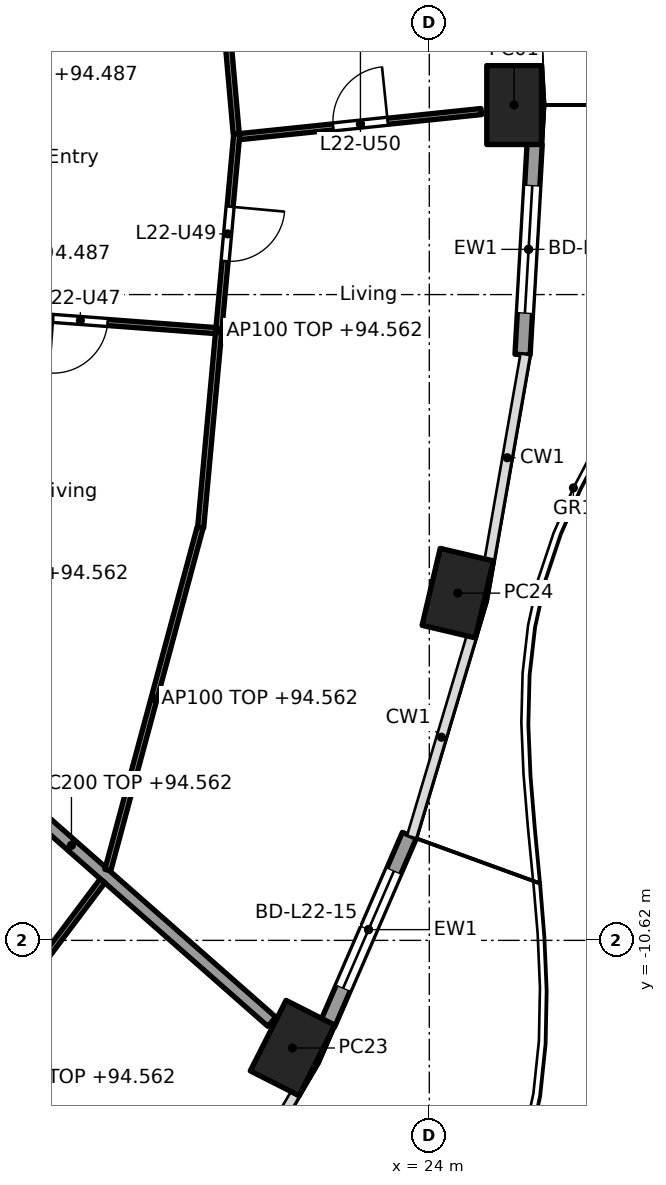
"""IFC4 building model, lengths in metres.
Left out: names, types, materials, properties, quantities, classifications, styles, units other than length and angle.
Written with IfcOpenShell. Run it as: python <this file> out.ifc"""

import sys

from ifc_helpers import new_model, si_unit, direction, frame, frame_2d, origin, origin_2d, place, context, subcontext, project, spatial, rectangle, hollow_rectangle, extrude, element, fill, save


model = new_model("IFC4")
c1 = context("Model", 3, precision=1e-05, world=origin(), true_north=direction((0.0, 1.0)))
c2 = subcontext(c1, "Body", "Model", "MODEL_VIEW")
j1 = project(units=[si_unit("LENGTHUNIT", "METRE"), si_unit("PLANEANGLEUNIT", "RADIAN")], contexts=[c1])
p1 = place(None, origin())
s1 = spatial("IfcSite", under=j1, at=p1, CompositionType="ELEMENT")
p2 = place(p1, origin())
s2 = spatial("IfcBuilding", under=s1, at=p2, CompositionType="ELEMENT")
p3 = place(p2, frame((0.0, 0.0, 91.8)))
s3 = spatial("IfcBuildingStorey", under=s2, at=p3, CompositionType="ELEMENT", Elevation=91.8)
for number, where, z_axis, x_axis in (
    (1, (25.395, 3.118, 0.0), (0.0, 0.0, 1.0), (0.0, 1.0, 0.0)),
    (2, (21.751, -12.39, 0.0), (0.0, 0.0, 1.0), (0.452, 0.892, 0.0)),
    (3, (24.468, -4.91, 0.0), (0.0, 0.0, 1.0), (0.229, 0.973, 0.0)),
):
    element("IfcColumn", number, at=place(p3, frame(where, z_axis=z_axis, x_axis=x_axis)), inside=s3, PredefinedType="COLUMN", context=c2, shape_type="SweptSolid", body=[
        extrude(hollow_rectangle(XDim=1.3, YDim=0.9, WallThickness=0.045, at=origin_2d()), origin(), (0.0, 0.0, 1.0), 3.7),
    ])
p4 = place(p3, frame((23.672, -8.893, 0.0), z_axis=(0.0, 0.0, 1.0), x_axis=(-0.397621629246, -0.917549475481, 0.0)))
e4 = element("IfcWall", 4, at=p4, inside=s3, PredefinedType="SOLIDWALL", context=c2, shape_type="SweptSolid", body=[
    extrude(rectangle(XDim=3.379, YDim=0.25, at=frame_2d((1.69, 0.0))), origin(), (0.0, 0.0, 1.0), 3.44),
])
p5 = place(p4, frame((0.64, 0.0, 0.0)))
e5 = element("IfcOpeningElement", 5, at=p5, cuts=e4, PredefinedType="OPENING", context=c2, shape_type="SweptSolid", body=[
    extrude(rectangle(XDim=2.1, YDim=2.4, at=frame_2d((1.05, 1.2))), frame((0.0, 0.135, 0.0), z_axis=(0.0, -1.0, 0.0), x_axis=(1.0, 0.0, 0.0)), (0.0, 0.0, 1.0), 0.27),
])
p6 = place(p3, frame((25.733, 2.476, 0.0), z_axis=(0.0, 0.0, 1.0), x_axis=(-0.057542602614, -0.998343051703, 0.0)))
e6 = element("IfcWall", 6, at=p6, inside=s3, PredefinedType="SOLIDWALL", context=c2, shape_type="SweptSolid", body=[
    extrude(rectangle(XDim=3.471, YDim=0.25, at=frame_2d((1.735, 0.0))), origin(), (0.0, 0.0, 1.0), 3.44),
])
p7 = place(p6, frame((0.685, 0.0, 0.0)))
e7 = element("IfcOpeningElement", 7, at=p7, cuts=e6, PredefinedType="OPENING", context=c2, shape_type="SweptSolid", body=[
    extrude(rectangle(XDim=2.1, YDim=2.4, at=frame_2d((1.05, 1.2))), frame((0.0, 0.135, 0.0), z_axis=(0.0, -1.0, 0.0), x_axis=(1.0, 0.0, 0.0)), (0.0, 0.0, 1.0), 0.27),
])
p8 = place(p3, frame((14.82, -6.156, 0.0), z_axis=(0.0, 0.0, 1.0), x_axis=(0.750582231659, -0.660777052808, 0.0)))
e8 = element("IfcWall", 8, at=p8, inside=s3, PredefinedType="PARTITIONING", context=c2, shape_type="SweptSolid", body=[
    extrude(rectangle(XDim=8.781, YDim=0.2, at=frame_2d((4.391, 0.0))), origin(), (0.0, 0.0, 1.0), 2.762),
])
p9 = place(p3, frame((20.879, 2.597, 0.0), z_axis=(0.0, 0.0, 1.0), x_axis=(0.994666546694, 0.103142914868, 0.0)))
e9 = element("IfcWall", 9, at=p9, inside=s3, PredefinedType="PARTITIONING", context=c2, shape_type="SweptSolid", body=[
    extrude(rectangle(XDim=3.998, YDim=0.1, at=frame_2d((1.999, 0.0))), origin(), (0.0, 0.0, 1.0), 2.762),
])
p10 = place(p9, frame((1.549, 0.0, 0.0)))
e10 = element("IfcOpeningElement", 10, at=p10, cuts=e9, PredefinedType="OPENING", context=c2, shape_type="SweptSolid", body=[
    extrude(rectangle(XDim=0.9, YDim=2.1, at=frame_2d((0.45, 1.05))), frame((0.0, 0.06, 0.0), z_axis=(0.0, -1.0, 0.0), x_axis=(1.0, 0.0, 0.0)), (0.0, 0.0, 1.0), 0.12),
])
p11 = place(p3, frame((20.825, 2.642, 0.0), z_axis=(0.0, 0.0, 1.0), x_axis=(-0.08776129045, 0.99614153407, 0.0)))
e11 = element("IfcWall", 11, at=p11, inside=s3, PredefinedType="PARTITIONING", context=c2, shape_type="SweptSolid", body=[
    extrude(rectangle(XDim=6.237, YDim=0.1, at=frame_2d((3.119, 0.0))), origin(), (0.0, 0.0, 1.0), 2.762),
])
p12 = place(p3, frame((20.834, 2.642, 0.0), z_axis=(0.0, 0.0, 1.0), x_axis=(-0.091385407685, -0.995815599025, 0.0)))
e12 = element("IfcWall", 12, at=p12, inside=s3, PredefinedType="PARTITIONING", context=c2, shape_type="SweptSolid", body=[
    extrude(rectangle(XDim=6.502, YDim=0.1, at=frame_2d((3.251, 0.0))), origin(), (0.0, 0.0, 1.0), 2.762),
])
p13 = place(p12, frame((1.201, 0.0, 0.0)))
e13 = element("IfcOpeningElement", 13, at=p13, cuts=e12, PredefinedType="OPENING", context=c2, shape_type="SweptSolid", body=[
    extrude(rectangle(XDim=0.9, YDim=2.1, at=frame_2d((0.45, 1.05))), frame((0.0, 0.06, 0.0), z_axis=(0.0, -1.0, 0.0), x_axis=(1.0, 0.0, 0.0)), (0.0, 0.0, 1.0), 0.12),
])
p14 = place(p3, frame((12.661, 3.497, 0.0), z_axis=(0.0, 0.0, 1.0), x_axis=(0.961626678623, 0.274361314621, 0.0)))
e14 = element("IfcWall", 14, at=p14, inside=s3, PredefinedType="PARTITIONING", context=c2, shape_type="SweptSolid", body=[
    extrude(rectangle(XDim=8.156, YDim=0.1, at=frame_2d((4.078, 0.0))), origin(), (0.0, 0.0, 1.0), 2.687),
])
p15 = place(p14, frame((0.446, 0.0, 0.0)))
e15 = element("IfcOpeningElement", 15, at=p15, cuts=e14, PredefinedType="OPENING", context=c2, shape_type="SweptSolid", body=[
    extrude(rectangle(XDim=0.9, YDim=2.1, at=frame_2d((0.45, 1.05))), frame((0.0, 0.06, 0.0), z_axis=(0.0, -1.0, 0.0), x_axis=(1.0, 0.0, 0.0)), (0.0, 0.0, 1.0), 0.12),
])
p16 = place(p14, frame((5.39, 0.0, 0.0)))
e16 = element("IfcOpeningElement", 16, at=p16, cuts=e14, PredefinedType="OPENING", context=c2, shape_type="SweptSolid", body=[
    extrude(rectangle(XDim=0.9, YDim=2.1, at=frame_2d((0.45, 1.05))), frame((0.0, 0.06, 0.0), z_axis=(0.0, -1.0, 0.0), x_axis=(1.0, 0.0, 0.0)), (0.0, 0.0, 1.0), 0.12),
])
p17 = place(p3, frame((14.432, -15.219, 0.0), z_axis=(0.0, 0.0, 1.0), x_axis=(0.601001256685, 0.799248077548, 0.0)))
e17 = element("IfcWall", 17, at=p17, inside=s3, PredefinedType="PARTITIONING", context=c2, shape_type="SweptSolid", body=[
    extrude(rectangle(XDim=6.98, YDim=0.1, at=frame_2d((3.49, 0.0))), origin(), (0.0, 0.0, 1.0), 2.762),
])
p18 = place(p3, frame((18.713, -9.464, 0.0), z_axis=(0.0, 0.0, 1.0), x_axis=(0.260279646259, 0.965533275316, 0.0)))
e18 = element("IfcWall", 18, at=p18, inside=s3, PredefinedType="PARTITIONING", context=c2, shape_type="SweptSolid", body=[
    extrude(rectangle(XDim=5.833, YDim=0.1, at=frame_2d((2.917, 0.0))), origin(), (0.0, 0.0, 1.0), 2.762),
])
p19 = place(p3, frame((12.665, -0.008, 0.0), z_axis=(0.0, 0.0, 1.0), x_axis=(0.997222647159, -0.074478130978, 0.0)))
e19 = element("IfcWall", 19, at=p19, inside=s3, PredefinedType="PARTITIONING", context=c2, shape_type="SweptSolid", body=[
    extrude(rectangle(XDim=7.844, YDim=0.1, at=frame_2d((3.922, 0.0))), origin(), (0.0, 0.0, 1.0), 2.687),
])
p20 = place(p19, frame((1.241, 0.0, 0.0)))
e20 = element("IfcOpeningElement", 20, at=p20, cuts=e19, PredefinedType="OPENING", context=c2, shape_type="SweptSolid", body=[
    extrude(rectangle(XDim=0.9, YDim=2.1, at=frame_2d((0.45, 1.05))), frame((0.0, 0.06, 0.0), z_axis=(0.0, -1.0, 0.0), x_axis=(1.0, 0.0, 0.0)), (0.0, 0.0, 1.0), 0.12),
])
p21 = place(p19, frame((5.163, 0.0, 0.0)))
e21 = element("IfcOpeningElement", 21, at=p21, cuts=e19, PredefinedType="OPENING", context=c2, shape_type="SweptSolid", body=[
    extrude(rectangle(XDim=0.9, YDim=2.1, at=frame_2d((0.45, 1.05))), frame((0.0, 0.06, 0.0), z_axis=(0.0, -1.0, 0.0), x_axis=(1.0, 0.0, 0.0)), (0.0, 0.0, 1.0), 0.12),
])
p22 = place(p5, origin())
e22 = element("IfcDoor", 22, at=p22, inside=s3, OperationType="SLIDING_TO_LEFT", PredefinedType="DOOR", context=c2, shape_type="SweptSolid", body=[
    extrude(rectangle(XDim=2.1, YDim=2.4, at=frame_2d((1.05, 1.2))), frame((0.0, 0.025, 0.0), z_axis=(0.0, -1.0, 0.0), x_axis=(1.0, 0.0, 0.0)), (0.0, 0.0, 1.0), 0.05),
])
fill(e5, e22)
p23 = place(p7, origin())
e23 = element("IfcDoor", 23, at=p23, inside=s3, OperationType="SLIDING_TO_LEFT", PredefinedType="DOOR", context=c2, shape_type="SweptSolid", body=[
    extrude(rectangle(XDim=2.1, YDim=2.4, at=frame_2d((1.05, 1.2))), frame((0.0, 0.025, 0.0), z_axis=(0.0, -1.0, 0.0), x_axis=(1.0, 0.0, 0.0)), (0.0, 0.0, 1.0), 0.05),
])
fill(e7, e23)
p24 = place(p21, frame((0.9, 0.0, 0.0), x_axis=(-1.0, 0.0, 0.0)))
e24 = element("IfcDoor", 24, at=p24, inside=s3, OperationType="SINGLE_SWING_RIGHT", PredefinedType="DOOR", context=c2, shape_type="SweptSolid", body=[
    extrude(rectangle(XDim=0.9, YDim=2.1, at=frame_2d((0.45, 1.05))), frame((0.0, 0.025, 0.0), z_axis=(0.0, -1.0, 0.0), x_axis=(1.0, 0.0, 0.0)), (0.0, 0.0, 1.0), 0.05),
])
fill(e21, e24)
p25 = place(p13, origin())
e25 = element("IfcDoor", 25, at=p25, inside=s3, OperationType="SINGLE_SWING_LEFT", PredefinedType="DOOR", context=c2, shape_type="SweptSolid", body=[
    extrude(rectangle(XDim=0.9, YDim=2.1, at=frame_2d((0.45, 1.05))), frame((0.0, 0.025, 0.0), z_axis=(0.0, -1.0, 0.0), x_axis=(1.0, 0.0, 0.0)), (0.0, 0.0, 1.0), 0.05),
])
fill(e13, e25)
p26 = place(p10, origin())
e26 = element("IfcDoor", 26, at=p26, inside=s3, OperationType="SINGLE_SWING_RIGHT", PredefinedType="DOOR", context=c2, shape_type="SweptSolid", body=[
    extrude(rectangle(XDim=0.9, YDim=2.1, at=frame_2d((0.45, 1.05))), frame((0.0, 0.025, 0.0), z_axis=(0.0, -1.0, 0.0), x_axis=(1.0, 0.0, 0.0)), (0.0, 0.0, 1.0), 0.05),
])
fill(e10, e26)
save(model, sys.argv[1])
